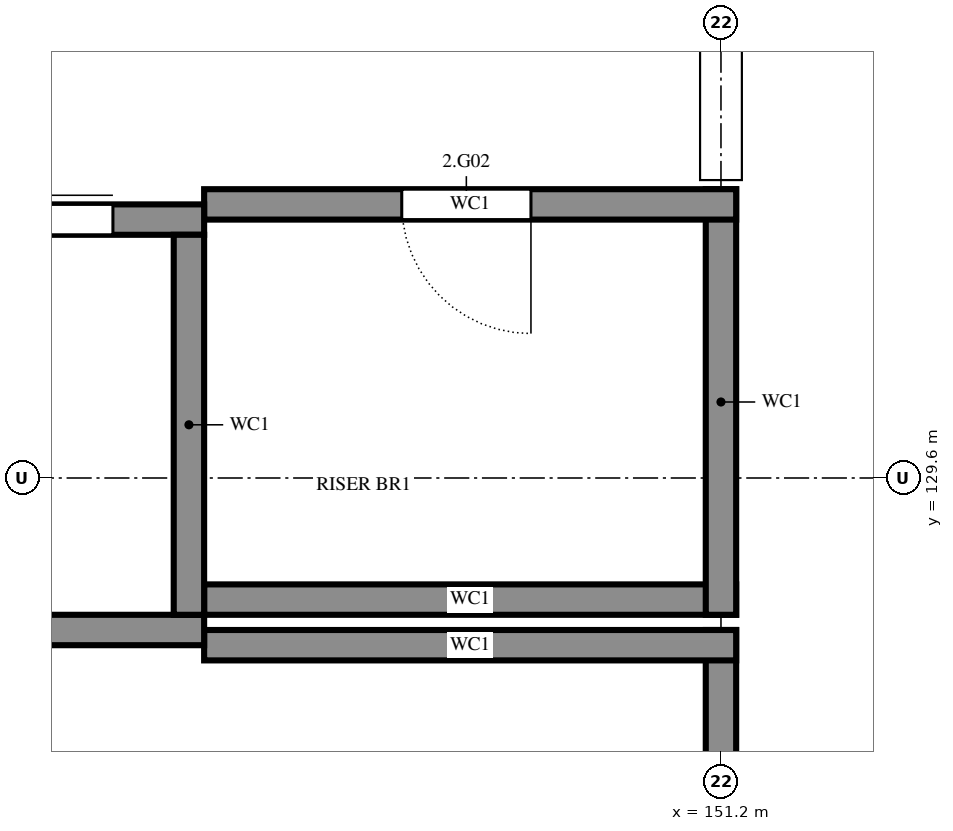
"""IFC4 building model, lengths in metres.
Left out: names, types, materials, properties, quantities, classifications, styles, units other than length and angle.
Written with IfcOpenShell. Run it as: python <this file> out.ifc"""

import sys

from ifc_helpers import new_model, si_unit, direction, frame, frame_2d, origin, place, context, subcontext, project, spatial, rectangle, extrude, element, fill, save


model = new_model("IFC4")
c1 = context("Model", 3, precision=1e-05, world=origin(), true_north=direction((0.0, 1.0)))
c2 = subcontext(c1, "Body", "Model", "MODEL_VIEW")
j1 = project(units=[si_unit("LENGTHUNIT", "METRE"), si_unit("PLANEANGLEUNIT", "RADIAN")], contexts=[c1])
p1 = place(None, origin())
s1 = spatial("IfcSite", under=j1, at=p1, CompositionType="ELEMENT")
p2 = place(p1, origin())
s2 = spatial("IfcBuilding", under=s1, at=p2, CompositionType="ELEMENT")
p3 = place(p2, frame((0.0, 0.0, 7.2)))
s3 = spatial("IfcBuildingStorey", under=s2, at=p3, CompositionType="ELEMENT", Elevation=7.2)
p4 = place(p3, frame((151.2, 125.3, 0.0), z_axis=(0.0, 0.0, 1.0), x_axis=(0.0, 1.0, 0.0)))
e1 = element("IfcWall", 1, at=p4, inside=s3, PredefinedType="SHEAR", context=c2, shape_type="SweptSolid", body=[
    extrude(rectangle(XDim=3.3, YDim=0.2, at=frame_2d((1.65, 0.0))), origin(), (0.0, 0.0, 1.0), 3.6),
])
for number, where, z_axis, x_axis in (
    (2, (147.8, 128.5, 0.0), (0.0, 0.0, 1.0), (1.0, 0.0, 0.0)),
    (3, (147.8, 128.8, 0.0), (0.0, 0.0, 1.0), (1.0, 0.0, 0.0)),
):
    element("IfcWall", number, at=place(p3, frame(where, z_axis=z_axis, x_axis=x_axis)), inside=s3, PredefinedType="SHEAR", context=c2, shape_type="SweptSolid", body=[
        extrude(rectangle(XDim=3.5, YDim=0.2, at=frame_2d((1.75, 0.0))), origin(), (0.0, 0.0, 1.0), 3.6),
    ])
p5 = place(p3, frame((151.2, 128.7, 0.0), z_axis=(0.0, 0.0, 1.0), x_axis=(0.0, 1.0, 0.0)))
e4 = element("IfcWall", 4, at=p5, inside=s3, PredefinedType="SHEAR", context=c2, shape_type="SweptSolid", body=[
    extrude(rectangle(XDim=2.8, YDim=0.2, at=frame_2d((1.4, 0.0))), origin(), (0.0, 0.0, 1.0), 3.6),
])
p6 = place(p3, frame((151.3, 131.4, 0.0), z_axis=(0.0, 0.0, 1.0), x_axis=(-1.0, 0.0, 0.0)))
e5 = element("IfcWall", 5, at=p6, inside=s3, PredefinedType="SHEAR", context=c2, shape_type="SweptSolid", body=[
    extrude(rectangle(XDim=3.5, YDim=0.2, at=frame_2d((1.75, 0.0))), origin(), (0.0, 0.0, 1.0), 3.6),
])
p7 = place(p6, frame((1.35, 0.0, 0.0)))
e6 = element("IfcOpeningElement", 6, at=p7, cuts=e5, PredefinedType="OPENING", context=c2, shape_type="SweptSolid", body=[
    extrude(rectangle(XDim=0.85, YDim=2.1, at=frame_2d((0.425, 1.05))), frame((0.0, 0.11, 0.0), z_axis=(0.0, -1.0, 0.0), x_axis=(1.0, 0.0, 0.0)), (0.0, 0.0, 1.0), 0.22),
])
p8 = place(p3, frame((145.4, 128.6, 0.0), z_axis=(0.0, 0.0, 1.0), x_axis=(1.0, 0.0, 0.0)))
e7 = element("IfcWall", 7, at=p8, inside=s3, PredefinedType="SHEAR", context=c2, shape_type="SweptSolid", body=[
    extrude(rectangle(XDim=2.4, YDim=0.2, at=frame_2d((1.2, 0.0))), origin(), (0.0, 0.0, 1.0), 3.6),
])
p9 = place(p3, frame((145.4, 131.3, 0.0), z_axis=(0.0, 0.0, 1.0), x_axis=(1.0, 0.0, 0.0)))
e8 = element("IfcWall", 8, at=p9, inside=s3, PredefinedType="SHEAR", context=c2, shape_type="SweptSolid", body=[
    extrude(rectangle(XDim=2.4, YDim=0.2, at=frame_2d((1.2, 0.0))), origin(), (0.0, 0.0, 1.0), 3.6),
])
p10 = place(p9, frame((0.6, 0.0, 0.0)))
e9 = element("IfcOpeningElement", 9, at=p10, cuts=e8, PredefinedType="OPENING", context=c2, shape_type="SweptSolid", body=[
    extrude(rectangle(XDim=1.2, YDim=2.1, at=frame_2d((0.6, 1.05))), frame((0.0, 0.11, 0.0), z_axis=(0.0, -1.0, 0.0), x_axis=(1.0, 0.0, 0.0)), (0.0, 0.0, 1.0), 0.22),
])
p11 = place(p3, frame((147.7, 128.7, 0.0), z_axis=(0.0, 0.0, 1.0), x_axis=(0.0, 1.0, 0.0)))
e10 = element("IfcWall", 10, at=p11, inside=s3, PredefinedType="SHEAR", context=c2, shape_type="SweptSolid", body=[
    extrude(rectangle(XDim=2.5, YDim=0.2, at=frame_2d((1.25, 0.0))), origin(), (0.0, 0.0, 1.0), 3.6),
])
p12 = place(p3, frame((151.2, 136.65, 0.0), z_axis=(0.0, 0.0, 1.0), x_axis=(0.0, -1.0, 0.0)))
e11 = element("IfcWall", 11, at=p12, inside=s3, PredefinedType="PARTITIONING", context=c2, shape_type="SweptSolid", body=[
    extrude(rectangle(XDim=5.09, YDim=0.275, at=frame_2d((2.545, 0.0))), origin(), (0.0, 0.0, 1.0), 3.6),
])
p13 = place(p12, frame((0.24, 0.0, 0.0)))
e12 = element("IfcOpeningElement", 12, at=p13, cuts=e11, PredefinedType="OPENING", context=c2, shape_type="SweptSolid", body=[
    extrude(rectangle(XDim=2.1, YDim=2.4, at=frame_2d((1.05, 1.2))), frame((0.0, 0.147, 0.0), z_axis=(0.0, -1.0, 0.0), x_axis=(1.0, 0.0, 0.0)), (0.0, 0.0, 1.0), 0.295),
])
p14 = place(p10, origin())
e13 = element("IfcDoor", 13, at=p14, inside=s3, OperationType="SLIDING_TO_LEFT", PredefinedType="DOOR", context=c2, shape_type="SweptSolid", body=[
    extrude(rectangle(XDim=1.2, YDim=2.1, at=frame_2d((0.6, 1.05))), frame((0.0, 0.025, 0.0), z_axis=(0.0, -1.0, 0.0), x_axis=(1.0, 0.0, 0.0)), (0.0, 0.0, 1.0), 0.05),
])
fill(e9, e13)
p15 = place(p7, origin())
e14 = element("IfcDoor", 14, at=p15, inside=s3, OperationType="SINGLE_SWING_RIGHT", PredefinedType="DOOR", context=c2, shape_type="SweptSolid", body=[
    extrude(rectangle(XDim=0.85, YDim=2.1, at=frame_2d((0.425, 1.05))), frame((0.0, 0.025, 0.0), z_axis=(0.0, -1.0, 0.0), x_axis=(1.0, 0.0, 0.0)), (0.0, 0.0, 1.0), 0.05),
])
fill(e6, e14)
save(model, sys.argv[1])
